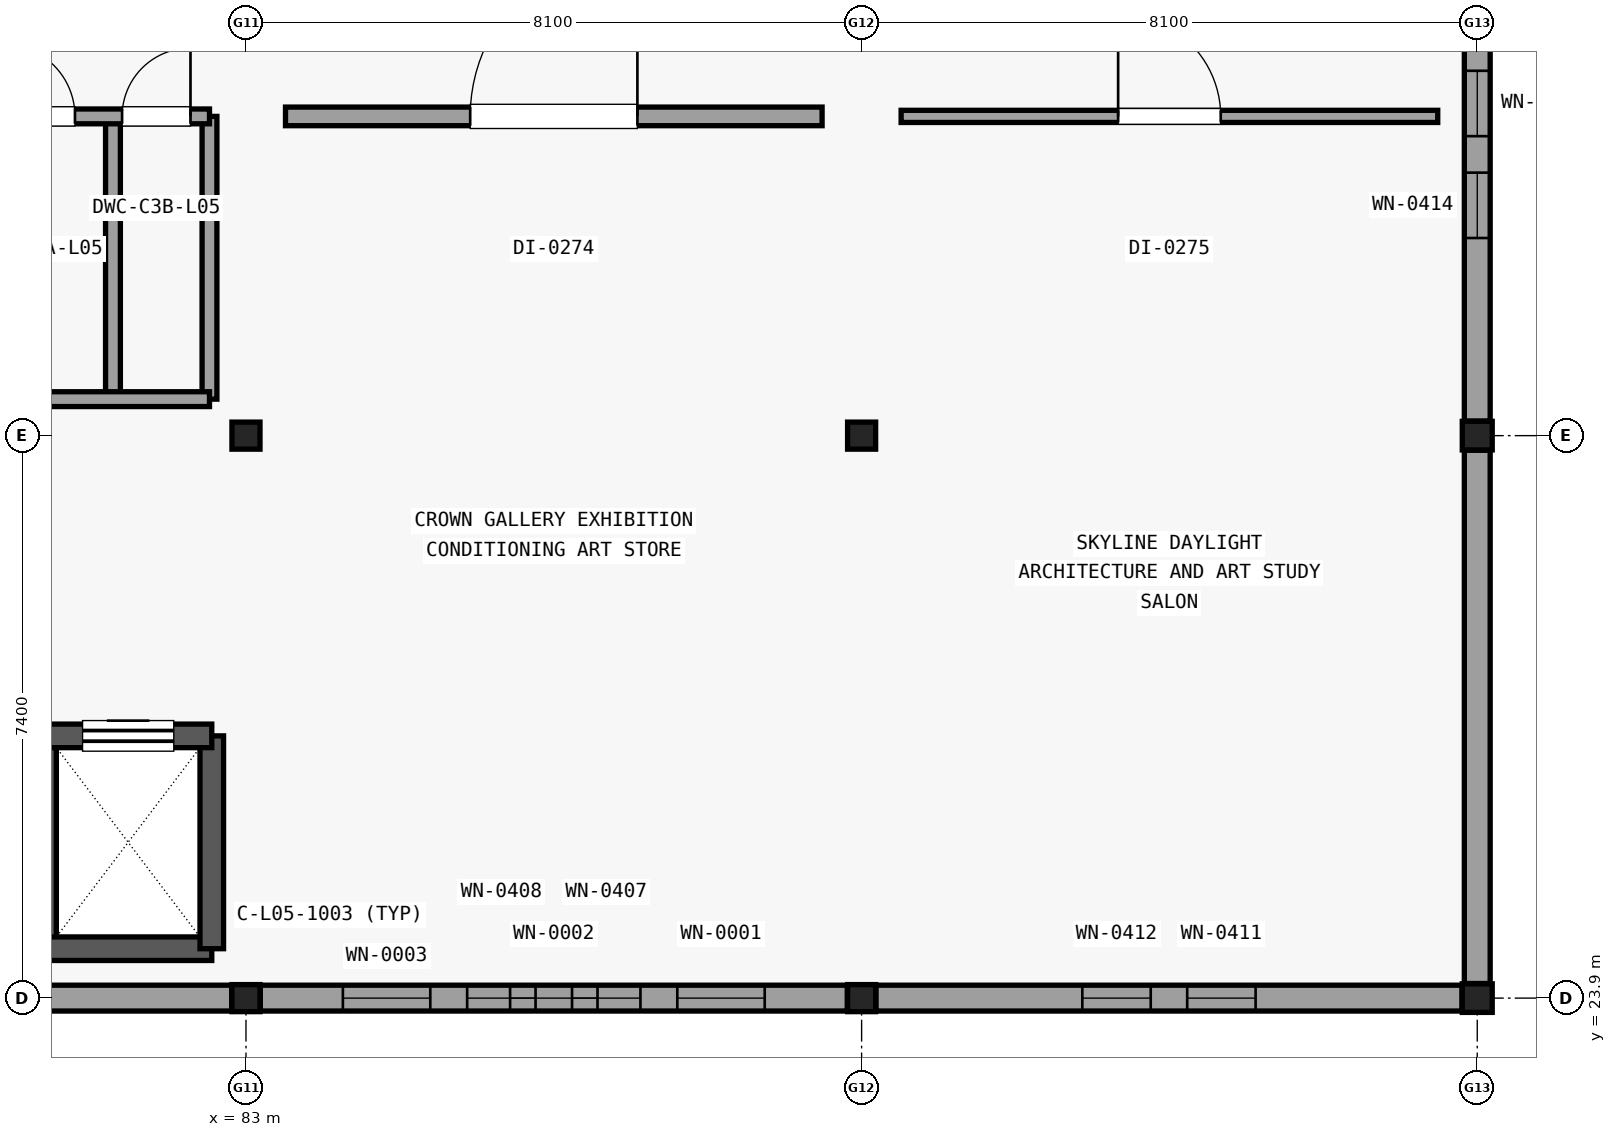
"""IFC4 building model, lengths in metres.
Left out: names, types, materials, properties, quantities, classifications, styles, units other than length and angle.
Written with IfcOpenShell. Run it as: python <this file> out.ifc"""

import sys

from ifc_helpers import new_model, si_unit, direction, frame, frame_2d, origin, origin_2d, place, context, subcontext, project, spatial, rectangle, i_section, extrude, element, fill, save


model = new_model("IFC4")
c1 = context("Model", 3, precision=1e-05, world=origin(), true_north=direction((0.0, 1.0)))
c2 = subcontext(c1, "Body", "Model", "MODEL_VIEW")
j1 = project(units=[si_unit("LENGTHUNIT", "METRE"), si_unit("PLANEANGLEUNIT", "RADIAN")], contexts=[c1])
p1 = place(None, origin())
s1 = spatial("IfcSite", under=j1, at=p1, CompositionType="ELEMENT")
p2 = place(p1, origin())
s2 = spatial("IfcBuilding", under=s1, at=p2, CompositionType="ELEMENT")
p3 = place(p2, frame((0.0, 0.0, 21.0)))
s3 = spatial("IfcBuildingStorey", under=s2, at=p3, CompositionType="ELEMENT", Elevation=21.0)
for number, where, z_axis, x_axis in (
    (1, (83.0, 23.9, 0.0), (0.0, 0.0, 1.0), (1.0, 0.0, 0.0)),
    (2, (83.0, 31.3, 0.0), (0.0, 0.0, 1.0), (1.0, 0.0, 0.0)),
    (3, (91.1, 23.9, 0.0), (0.0, 0.0, 1.0), (1.0, 0.0, 0.0)),
    (4, (91.1, 31.3, 0.0), (0.0, 0.0, 1.0), (1.0, 0.0, 0.0)),
):
    element("IfcColumn", number, at=place(p3, frame(where, z_axis=z_axis, x_axis=x_axis)), inside=s3, PredefinedType="COLUMN", context=c2, shape_type="SweptSolid", body=[
        extrude(i_section(OverallWidth=0.369, OverallDepth=0.356, WebThickness=0.011, FlangeThickness=0.018, at=origin_2d()), origin(), (0.0, 0.0, 1.0), 5.19),
    ])
for number, where, z_axis, x_axis in (
    (5, (99.2, 23.9, 0.0), (0.0, 0.0, 1.0), (1.0, 0.0, 0.0)),
    (6, (99.2, 31.3, 0.0), (0.0, 0.0, 1.0), (1.0, 0.0, 0.0)),
):
    element("IfcColumn", number, at=place(p3, frame(where, z_axis=z_axis, x_axis=x_axis)), inside=s3, PredefinedType="COLUMN", context=c2, shape_type="SweptSolid", body=[
        extrude(i_section(OverallWidth=0.394, OverallDepth=0.376, WebThickness=0.017, FlangeThickness=0.028, at=origin_2d()), origin(), (0.0, 0.0, 1.0), 5.4),
    ])
p4 = place(p3, frame((99.003, 23.9, 5.18), z_axis=(0.0, 0.0, 1.0), x_axis=(-1.0, 0.0, 0.0)))
e7 = element("IfcWall", 7, at=p4, inside=s3, PredefinedType="SOLIDWALL", context=c2, shape_type="SweptSolid", body=[
    extrude(rectangle(XDim=23.906, YDim=0.32, at=frame_2d((11.953, 0.0))), origin(), (0.0, 0.0, 1.0), 1.57),
])
p5 = place(p3, frame((94.7, 23.9, 6.75), z_axis=(0.0, 0.0, 1.0), x_axis=(-1.0, 0.0, 0.0)))
e8 = element("IfcWall", 8, at=p5, inside=s3, PredefinedType="SOLIDWALL", context=c2, shape_type="SweptSolid", body=[
    extrude(rectangle(XDim=15.3, YDim=0.32, at=frame_2d((7.65, 0.0))), origin(), (0.0, 0.0, 1.0), 4.25),
])
p6 = place(p5, frame((4.875, 0.0, 0.25)))
e9 = element("IfcOpeningElement", 9, at=p6, cuts=e8, PredefinedType="OPENING", context=c2, shape_type="SweptSolid", body=[
    extrude(rectangle(XDim=1.15, YDim=3.6, at=frame_2d((0.575, 1.8))), frame((0.0, 0.17, 0.0), z_axis=(0.0, -1.0, 0.0), x_axis=(1.0, 0.0, 0.0)), (0.0, 0.0, 1.0), 0.34),
])
p7 = place(p5, frame((7.075, 0.0, 0.25)))
e10 = element("IfcOpeningElement", 10, at=p7, cuts=e8, PredefinedType="OPENING", context=c2, shape_type="SweptSolid", body=[
    extrude(rectangle(XDim=1.15, YDim=3.6, at=frame_2d((0.575, 1.8))), frame((0.0, 0.17, 0.0), z_axis=(0.0, -1.0, 0.0), x_axis=(1.0, 0.0, 0.0)), (0.0, 0.0, 1.0), 0.34),
])
p8 = place(p5, frame((9.275, 0.0, 0.25)))
e11 = element("IfcOpeningElement", 11, at=p8, cuts=e8, PredefinedType="OPENING", context=c2, shape_type="SweptSolid", body=[
    extrude(rectangle(XDim=1.15, YDim=3.6, at=frame_2d((0.575, 1.8))), frame((0.0, 0.17, 0.0), z_axis=(0.0, -1.0, 0.0), x_axis=(1.0, 0.0, 0.0)), (0.0, 0.0, 1.0), 0.34),
])
p9 = place(p3, frame((82.812, 23.9, 0.0), z_axis=(0.0, 0.0, 1.0), x_axis=(-1.0, 0.0, 0.0)))
e12 = element("IfcWall", 12, at=p9, inside=s3, PredefinedType="SOLIDWALL", context=c2, shape_type="SweptSolid", body=[
    extrude(rectangle(XDim=7.71, YDim=0.34, at=frame_2d((3.855, 0.0))), origin(), (0.0, 0.0, 1.0), 4.718),
])
p10 = place(p9, frame((2.715, 0.0, 2.35)))
e13 = element("IfcOpeningElement", 13, at=p10, cuts=e12, PredefinedType="OPENING", context=c2, shape_type="SweptSolid", body=[
    extrude(rectangle(XDim=0.9, YDim=1.62, at=frame_2d((0.45, 0.81))), frame((0.0, 0.18, 0.0), z_axis=(0.0, -1.0, 0.0), x_axis=(1.0, 0.0, 0.0)), (0.0, 0.0, 1.0), 0.36),
])
p11 = place(p9, frame((4.095, 0.0, 2.35)))
e14 = element("IfcOpeningElement", 14, at=p11, cuts=e12, PredefinedType="OPENING", context=c2, shape_type="SweptSolid", body=[
    extrude(rectangle(XDim=0.9, YDim=1.62, at=frame_2d((0.45, 0.81))), frame((0.0, 0.18, 0.0), z_axis=(0.0, -1.0, 0.0), x_axis=(1.0, 0.0, 0.0)), (0.0, 0.0, 1.0), 0.36),
])
p12 = place(p3, frame((90.912, 23.9, 0.0), z_axis=(0.0, 0.0, 1.0), x_axis=(-1.0, 0.0, 0.0)))
e15 = element("IfcWall", 15, at=p12, inside=s3, PredefinedType="SOLIDWALL", context=c2, shape_type="SweptSolid", body=[
    extrude(rectangle(XDim=7.723, YDim=0.34, at=frame_2d((3.862, 0.0))), origin(), (0.0, 0.0, 1.0), 4.718),
])
p13 = place(p12, frame((2.721, 0.0, 2.35)))
e16 = element("IfcOpeningElement", 16, at=p13, cuts=e15, PredefinedType="OPENING", context=c2, shape_type="SweptSolid", body=[
    extrude(rectangle(XDim=0.9, YDim=1.62, at=frame_2d((0.45, 0.81))), frame((0.0, 0.18, 0.0), z_axis=(0.0, -1.0, 0.0), x_axis=(1.0, 0.0, 0.0)), (0.0, 0.0, 1.0), 0.36),
])
p14 = place(p12, frame((4.102, 0.0, 2.35)))
e17 = element("IfcOpeningElement", 17, at=p14, cuts=e15, PredefinedType="OPENING", context=c2, shape_type="SweptSolid", body=[
    extrude(rectangle(XDim=0.9, YDim=1.62, at=frame_2d((0.45, 0.81))), frame((0.0, 0.18, 0.0), z_axis=(0.0, -1.0, 0.0), x_axis=(1.0, 0.0, 0.0)), (0.0, 0.0, 1.0), 0.36),
])
p15 = place(p3, frame((98.999, 23.9, 0.0), z_axis=(0.0, 0.0, 1.0), x_axis=(-1.0, 0.0, 0.0)))
e18 = element("IfcWall", 18, at=p15, inside=s3, PredefinedType="SOLIDWALL", context=c2, shape_type="SweptSolid", body=[
    extrude(rectangle(XDim=7.71, YDim=0.34, at=frame_2d((3.855, 0.0))), origin(), (0.0, 0.0, 1.0), 4.718),
])
p16 = place(p15, frame((2.715, 0.0, 2.35)))
e19 = element("IfcOpeningElement", 19, at=p16, cuts=e18, PredefinedType="OPENING", context=c2, shape_type="SweptSolid", body=[
    extrude(rectangle(XDim=0.9, YDim=1.62, at=frame_2d((0.45, 0.81))), frame((0.0, 0.18, 0.0), z_axis=(0.0, -1.0, 0.0), x_axis=(1.0, 0.0, 0.0)), (0.0, 0.0, 1.0), 0.36),
])
p17 = place(p15, frame((4.095, 0.0, 2.35)))
e20 = element("IfcOpeningElement", 20, at=p17, cuts=e18, PredefinedType="OPENING", context=c2, shape_type="SweptSolid", body=[
    extrude(rectangle(XDim=0.9, YDim=1.62, at=frame_2d((0.45, 0.81))), frame((0.0, 0.18, 0.0), z_axis=(0.0, -1.0, 0.0), x_axis=(1.0, 0.0, 0.0)), (0.0, 0.0, 1.0), 0.36),
])
p18 = place(p3, frame((99.2, 31.108, 0.0), z_axis=(0.0, 0.0, 1.0), x_axis=(0.0, -1.0, 0.0)))
e21 = element("IfcWall", 21, at=p18, inside=s3, PredefinedType="SOLIDWALL", context=c2, shape_type="SweptSolid", body=[
    extrude(rectangle(XDim=7.016, YDim=0.34, at=frame_2d((3.508, 0.0))), origin(), (0.0, 0.0, 1.0), 4.718),
])
p19 = place(p3, frame((99.2, 38.508, 0.0), z_axis=(0.0, 0.0, 1.0), x_axis=(0.0, -1.0, 0.0)))
e22 = element("IfcWall", 22, at=p19, inside=s3, PredefinedType="SOLIDWALL", context=c2, shape_type="SweptSolid", body=[
    extrude(rectangle(XDim=7.016, YDim=0.34, at=frame_2d((3.508, 0.0))), origin(), (0.0, 0.0, 1.0), 4.718),
])
p20 = place(p19, frame((2.408, 0.0, 2.35)))
e23 = element("IfcOpeningElement", 23, at=p20, cuts=e22, PredefinedType="OPENING", context=c2, shape_type="SweptSolid", body=[
    extrude(rectangle(XDim=0.86, YDim=1.58, at=frame_2d((0.43, 0.79))), frame((0.0, 0.18, 0.0), z_axis=(0.0, -1.0, 0.0), x_axis=(1.0, 0.0, 0.0)), (0.0, 0.0, 1.0), 0.36),
])
p21 = place(p19, frame((3.748, 0.0, 2.35)))
e24 = element("IfcOpeningElement", 24, at=p21, cuts=e22, PredefinedType="OPENING", context=c2, shape_type="SweptSolid", body=[
    extrude(rectangle(XDim=0.86, YDim=1.58, at=frame_2d((0.43, 0.79))), frame((0.0, 0.18, 0.0), z_axis=(0.0, -1.0, 0.0), x_axis=(1.0, 0.0, 0.0)), (0.0, 0.0, 1.0), 0.36),
])
p22 = place(p3, frame((80.35, 24.55, 0.0), z_axis=(0.0, 0.0, 1.0), x_axis=(0.0, 1.0, 0.0)))
e25 = element("IfcWall", 25, at=p22, inside=s3, PredefinedType="SHEAR", context=c2, shape_type="SweptSolid", body=[
    extrude(rectangle(XDim=2.8, YDim=0.31, at=frame_2d((1.4, 0.0))), origin(), (0.0, 0.0, 1.0), 5.185),
])
p23 = place(p3, frame((80.35, 24.55, 0.0), z_axis=(0.0, 0.0, 1.0), x_axis=(1.0, 0.0, 0.0)))
e26 = element("IfcWall", 26, at=p23, inside=s3, PredefinedType="SHEAR", context=c2, shape_type="SweptSolid", body=[
    extrude(rectangle(XDim=2.2, YDim=0.31, at=frame_2d((1.1, 0.0))), origin(), (0.0, 0.0, 1.0), 5.185),
])
p24 = place(p3, frame((82.55, 24.55, 0.0), z_axis=(0.0, 0.0, 1.0), x_axis=(0.0, 1.0, 0.0)))
e27 = element("IfcWall", 27, at=p24, inside=s3, PredefinedType="SHEAR", context=c2, shape_type="SweptSolid", body=[
    extrude(rectangle(XDim=2.8, YDim=0.31, at=frame_2d((1.4, 0.0))), origin(), (0.0, 0.0, 1.0), 5.185),
])
p25 = place(p3, frame((80.35, 27.35, 0.0), z_axis=(0.0, 0.0, 1.0), x_axis=(1.0, 0.0, 0.0)))
e28 = element("IfcWall", 28, at=p25, inside=s3, PredefinedType="SHEAR", context=c2, shape_type="SweptSolid", body=[
    extrude(rectangle(XDim=2.2, YDim=0.31, at=frame_2d((1.1, 0.0))), origin(), (0.0, 0.0, 1.0), 5.185),
])
p26 = place(p25, frame((0.5, 0.0, 0.0)))
e29 = element("IfcOpeningElement", 29, at=p26, cuts=e28, PredefinedType="OPENING", context=c2, shape_type="SweptSolid", body=[
    extrude(rectangle(XDim=1.2, YDim=2.15, at=frame_2d((0.6, 1.075))), frame((0.0, 0.165, 0.0), z_axis=(0.0, -1.0, 0.0), x_axis=(1.0, 0.0, 0.0)), (0.0, 0.0, 1.0), 0.33),
])
for number, where, z_axis, x_axis in (
    (30, (81.25, 31.78, 0.0), (0.0, 0.0, 1.0), (0.0, 1.0, 0.0)),
    (31, (82.52, 31.78, 0.0), (0.0, 0.0, 1.0), (0.0, 1.0, 0.0)),
):
    element("IfcWall", number, at=place(p3, frame(where, z_axis=z_axis, x_axis=x_axis)), inside=s3, PredefinedType="PARTITIONING", context=c2, shape_type="SweptSolid", body=[
        extrude(rectangle(XDim=3.72, YDim=0.195, at=frame_2d((1.86, 0.0))), origin(), (0.0, 0.0, 1.0), 4.723),
    ])
p27 = place(p3, frame((79.55, 31.78, 0.0), z_axis=(0.0, 0.0, 1.0), x_axis=(1.0, 0.0, 0.0)))
e32 = element("IfcWall", 32, at=p27, inside=s3, PredefinedType="PARTITIONING", context=c2, shape_type="SweptSolid", body=[
    extrude(rectangle(XDim=2.97, YDim=0.195, at=frame_2d((1.485, 0.0))), origin(), (0.0, 0.0, 1.0), 4.723),
])
p28 = place(p3, frame((79.55, 35.5, 0.0), z_axis=(0.0, 0.0, 1.0), x_axis=(1.0, 0.0, 0.0)))
e33 = element("IfcWall", 33, at=p28, inside=s3, PredefinedType="PARTITIONING", context=c2, shape_type="SweptSolid", body=[
    extrude(rectangle(XDim=2.97, YDim=0.195, at=frame_2d((1.485, 0.0))), origin(), (0.0, 0.0, 1.0), 5.175),
])
p29 = place(p28, frame((0.25, 0.0, 0.0)))
e34 = element("IfcOpeningElement", 34, at=p29, cuts=e33, PredefinedType="OPENING", context=c2, shape_type="SweptSolid", body=[
    extrude(rectangle(XDim=0.95, YDim=2.1, at=frame_2d((0.475, 1.05))), frame((0.0, 0.107, 0.0), z_axis=(0.0, -1.0, 0.0), x_axis=(1.0, 0.0, 0.0)), (0.0, 0.0, 1.0), 0.215),
])
p30 = place(p28, frame((1.82, 0.0, 0.0)))
e35 = element("IfcOpeningElement", 35, at=p30, cuts=e33, PredefinedType="OPENING", context=c2, shape_type="SweptSolid", body=[
    extrude(rectangle(XDim=0.9, YDim=2.1, at=frame_2d((0.45, 1.05))), frame((0.0, 0.107, 0.0), z_axis=(0.0, -1.0, 0.0), x_axis=(1.0, 0.0, 0.0)), (0.0, 0.0, 1.0), 0.215),
])
p31 = place(p3, frame((83.52, 35.5, 0.0), z_axis=(0.0, 0.0, 1.0), x_axis=(1.0, 0.0, 0.0)))
e36 = element("IfcWall", 36, at=p31, inside=s3, PredefinedType="PARTITIONING", context=c2, shape_type="SweptSolid", body=[
    extrude(rectangle(XDim=7.06, YDim=0.245, at=frame_2d((3.53, 0.0))), origin(), (0.0, 0.0, 1.0), 5.175),
])
p32 = place(p31, frame((2.43, 0.0, 0.0)))
e37 = element("IfcOpeningElement", 37, at=p32, cuts=e36, PredefinedType="OPENING", context=c2, shape_type="SweptSolid", body=[
    extrude(rectangle(XDim=2.2, YDim=2.65, at=frame_2d((1.1, 1.325))), frame((0.0, 0.133, 0.0), z_axis=(0.0, -1.0, 0.0), x_axis=(1.0, 0.0, 0.0)), (0.0, 0.0, 1.0), 0.265),
])
p33 = place(p3, frame((91.62, 35.5, 0.0), z_axis=(0.0, 0.0, 1.0), x_axis=(1.0, 0.0, 0.0)))
e38 = element("IfcWall", 38, at=p33, inside=s3, PredefinedType="PARTITIONING", context=c2, shape_type="SweptSolid", body=[
    extrude(rectangle(XDim=7.06, YDim=0.16, at=frame_2d((3.53, 0.0))), origin(), (0.0, 0.0, 1.0), 4.723),
])
p34 = place(p33, frame((2.855, 0.0, 0.0)))
e39 = element("IfcOpeningElement", 39, at=p34, cuts=e38, PredefinedType="OPENING", context=c2, shape_type="SweptSolid", body=[
    extrude(rectangle(XDim=1.35, YDim=2.2, at=frame_2d((0.675, 1.1))), frame((0.0, 0.09, 0.0), z_axis=(0.0, -1.0, 0.0), x_axis=(1.0, 0.0, 0.0)), (0.0, 0.0, 1.0), 0.18),
])
p35 = place(p6, origin())
e40 = element("IfcWindow", 40, at=p35, inside=s3, PartitioningType="SINGLE_PANEL", PredefinedType="WINDOW", context=c2, shape_type="SweptSolid", body=[
    extrude(rectangle(XDim=1.15, YDim=3.6, at=frame_2d((0.575, 1.8))), frame((0.0, 0.03, 0.0), z_axis=(0.0, -1.0, 0.0), x_axis=(1.0, 0.0, 0.0)), (0.0, 0.0, 1.0), 0.06),
])
fill(e9, e40)
p36 = place(p7, origin())
e41 = element("IfcWindow", 41, at=p36, inside=s3, PartitioningType="SINGLE_PANEL", PredefinedType="WINDOW", context=c2, shape_type="SweptSolid", body=[
    extrude(rectangle(XDim=1.15, YDim=3.6, at=frame_2d((0.575, 1.8))), frame((0.0, 0.03, 0.0), z_axis=(0.0, -1.0, 0.0), x_axis=(1.0, 0.0, 0.0)), (0.0, 0.0, 1.0), 0.06),
])
fill(e10, e41)
p37 = place(p8, origin())
e42 = element("IfcWindow", 42, at=p37, inside=s3, PartitioningType="SINGLE_PANEL", PredefinedType="WINDOW", context=c2, shape_type="SweptSolid", body=[
    extrude(rectangle(XDim=1.15, YDim=3.6, at=frame_2d((0.575, 1.8))), frame((0.0, 0.03, 0.0), z_axis=(0.0, -1.0, 0.0), x_axis=(1.0, 0.0, 0.0)), (0.0, 0.0, 1.0), 0.06),
])
fill(e11, e42)
p38 = place(p13, origin())
e43 = element("IfcWindow", 43, at=p38, inside=s3, PartitioningType="SINGLE_PANEL", PredefinedType="WINDOW", context=c2, shape_type="SweptSolid", body=[
    extrude(rectangle(XDim=0.9, YDim=1.62, at=frame_2d((0.45, 0.81))), frame((0.0, 0.03, 0.0), z_axis=(0.0, -1.0, 0.0), x_axis=(1.0, 0.0, 0.0)), (0.0, 0.0, 1.0), 0.06),
])
fill(e16, e43)
p39 = place(p14, origin())
e44 = element("IfcWindow", 44, at=p39, inside=s3, PartitioningType="SINGLE_PANEL", PredefinedType="WINDOW", context=c2, shape_type="SweptSolid", body=[
    extrude(rectangle(XDim=0.9, YDim=1.62, at=frame_2d((0.45, 0.81))), frame((0.0, 0.03, 0.0), z_axis=(0.0, -1.0, 0.0), x_axis=(1.0, 0.0, 0.0)), (0.0, 0.0, 1.0), 0.06),
])
fill(e17, e44)
p40 = place(p16, origin())
e45 = element("IfcWindow", 45, at=p40, inside=s3, PartitioningType="SINGLE_PANEL", PredefinedType="WINDOW", context=c2, shape_type="SweptSolid", body=[
    extrude(rectangle(XDim=0.9, YDim=1.62, at=frame_2d((0.45, 0.81))), frame((0.0, 0.03, 0.0), z_axis=(0.0, -1.0, 0.0), x_axis=(1.0, 0.0, 0.0)), (0.0, 0.0, 1.0), 0.06),
])
fill(e19, e45)
p41 = place(p17, origin())
e46 = element("IfcWindow", 46, at=p41, inside=s3, PartitioningType="SINGLE_PANEL", PredefinedType="WINDOW", context=c2, shape_type="SweptSolid", body=[
    extrude(rectangle(XDim=0.9, YDim=1.62, at=frame_2d((0.45, 0.81))), frame((0.0, 0.03, 0.0), z_axis=(0.0, -1.0, 0.0), x_axis=(1.0, 0.0, 0.0)), (0.0, 0.0, 1.0), 0.06),
])
fill(e20, e46)
p42 = place(p20, origin())
e47 = element("IfcWindow", 47, at=p42, inside=s3, PartitioningType="SINGLE_PANEL", PredefinedType="WINDOW", context=c2, shape_type="SweptSolid", body=[
    extrude(rectangle(XDim=0.86, YDim=1.58, at=frame_2d((0.43, 0.79))), frame((0.0, 0.03, 0.0), z_axis=(0.0, -1.0, 0.0), x_axis=(1.0, 0.0, 0.0)), (0.0, 0.0, 1.0), 0.06),
])
fill(e23, e47)
p43 = place(p21, origin())
e48 = element("IfcWindow", 48, at=p43, inside=s3, PartitioningType="SINGLE_PANEL", PredefinedType="WINDOW", context=c2, shape_type="SweptSolid", body=[
    extrude(rectangle(XDim=0.86, YDim=1.58, at=frame_2d((0.43, 0.79))), frame((0.0, 0.03, 0.0), z_axis=(0.0, -1.0, 0.0), x_axis=(1.0, 0.0, 0.0)), (0.0, 0.0, 1.0), 0.06),
])
fill(e24, e48)
p44 = place(p26, origin())
e49 = element("IfcDoor", 49, at=p44, inside=s3, OperationType="SLIDING_TO_LEFT", PredefinedType="DOOR", context=c2, shape_type="SweptSolid", body=[
    extrude(rectangle(XDim=1.2, YDim=2.15, at=frame_2d((0.6, 1.075))), frame((0.0, 0.025, 0.0), z_axis=(0.0, -1.0, 0.0), x_axis=(1.0, 0.0, 0.0)), (0.0, 0.0, 1.0), 0.05),
])
fill(e29, e49)
p45 = place(p29, origin())
e50 = element("IfcDoor", 50, at=p45, inside=s3, OperationType="SINGLE_SWING_LEFT", PredefinedType="DOOR", context=c2, shape_type="SweptSolid", body=[
    extrude(rectangle(XDim=0.95, YDim=2.1, at=frame_2d((0.475, 1.05))), frame((0.0, 0.025, 0.0), z_axis=(0.0, -1.0, 0.0), x_axis=(1.0, 0.0, 0.0)), (0.0, 0.0, 1.0), 0.05),
])
fill(e34, e50)
p46 = place(p30, origin())
e51 = element("IfcDoor", 51, at=p46, inside=s3, OperationType="SINGLE_SWING_RIGHT", PredefinedType="DOOR", context=c2, shape_type="SweptSolid", body=[
    extrude(rectangle(XDim=0.9, YDim=2.1, at=frame_2d((0.45, 1.05))), frame((0.0, 0.025, 0.0), z_axis=(0.0, -1.0, 0.0), x_axis=(1.0, 0.0, 0.0)), (0.0, 0.0, 1.0), 0.05),
])
fill(e35, e51)
p47 = place(p32, origin())
e52 = element("IfcDoor", 52, at=p47, inside=s3, OperationType="SINGLE_SWING_RIGHT", PredefinedType="DOOR", context=c2, shape_type="SweptSolid", body=[
    extrude(rectangle(XDim=2.2, YDim=2.65, at=frame_2d((1.1, 1.325))), frame((0.0, 0.025, 0.0), z_axis=(0.0, -1.0, 0.0), x_axis=(1.0, 0.0, 0.0)), (0.0, 0.0, 1.0), 0.05),
])
fill(e37, e52)
p48 = place(p34, origin())
e53 = element("IfcDoor", 53, at=p48, inside=s3, OperationType="SINGLE_SWING_LEFT", PredefinedType="DOOR", context=c2, shape_type="SweptSolid", body=[
    extrude(rectangle(XDim=1.35, YDim=2.2, at=frame_2d((0.675, 1.1))), frame((0.0, 0.025, 0.0), z_axis=(0.0, -1.0, 0.0), x_axis=(1.0, 0.0, 0.0)), (0.0, 0.0, 1.0), 0.05),
])
fill(e39, e53)
save(model, sys.argv[1])
